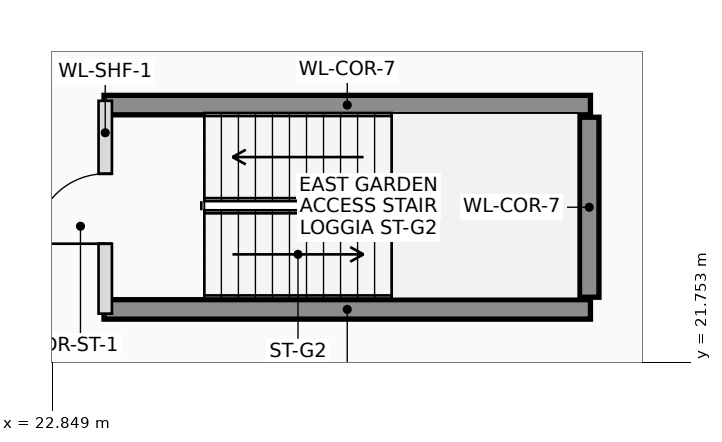
"""IFC4 building model, lengths in metres.
Left out: names, types, materials, properties, quantities, classifications, styles, units other than length and angle.
Written with IfcOpenShell. Run it as: python <this file> out.ifc"""

import sys

from ifc_helpers import new_model, si_unit, direction, frame, frame_2d, origin, place, context, subcontext, project, spatial, rectangle, extrude, element, fill, save


model = new_model("IFC4")
c1 = context("Model", 3, precision=1e-05, world=origin(), true_north=direction((0.0, 1.0)))
c2 = subcontext(c1, "Body", "Model", "MODEL_VIEW")
j1 = project(units=[si_unit("LENGTHUNIT", "METRE"), si_unit("PLANEANGLEUNIT", "RADIAN")], contexts=[c1])
p1 = place(None, origin())
s1 = spatial("IfcSite", under=j1, at=p1, CompositionType="ELEMENT")
p2 = place(p1, origin())
s2 = spatial("IfcBuilding", under=s1, at=p2, CompositionType="ELEMENT")
p3 = place(p2, frame((0.0, 0.0, 16.2)))
s3 = spatial("IfcBuildingStorey", under=s2, at=p3, CompositionType="ELEMENT", Elevation=16.2)
for number, where, z_axis, x_axis in (
    (1, (23.7, 25.98, 0.0), (0.0, 0.0, 1.0), (1.0, 0.0, 0.0)),
    (2, (23.7, 22.62, 0.0), (0.0, 0.0, 1.0), (1.0, 0.0, 0.0)),
):
    element("IfcWall", number, at=place(p3, frame(where, z_axis=z_axis, x_axis=x_axis)), inside=s3, PredefinedType="SHEAR", context=c2, shape_type="SweptSolid", body=[
        extrude(rectangle(XDim=8.0, YDim=0.32, at=frame_2d((4.0, 0.0))), origin(), (0.0, 0.0, 1.0), 3.9),
    ])
p4 = place(p3, frame((31.68, 22.82, 0.0), z_axis=(0.0, 0.0, 1.0), x_axis=(0.0, 1.0, 0.0)))
e3 = element("IfcWall", 3, at=p4, inside=s3, PredefinedType="SHEAR", context=c2, shape_type="SweptSolid", body=[
    extrude(rectangle(XDim=2.96, YDim=0.32, at=frame_2d((1.48, 0.0))), origin(), (0.0, 0.0, 1.0), 3.9),
])
p5 = place(p3, frame((23.72, 22.55, 0.0), z_axis=(0.0, 0.0, 1.0), x_axis=(0.0, 1.0, 0.0)))
e4 = element("IfcWall", 4, at=p5, inside=s3, PredefinedType="PLUMBINGWALL", context=c2, shape_type="SweptSolid", body=[
    extrude(rectangle(XDim=3.5, YDim=0.22, at=frame_2d((1.75, 0.0))), origin(), (0.0, 0.0, 1.0), 3.56),
])
p6 = place(p5, frame((1.15, 0.0, 0.0)))
e5 = element("IfcOpeningElement", 5, at=p6, cuts=e4, PredefinedType="OPENING", context=c2, shape_type="SweptSolid", body=[
    extrude(rectangle(XDim=1.15, YDim=2.15, at=frame_2d((0.575, 1.075))), frame((0.0, 0.12, 0.0), z_axis=(0.0, -1.0, 0.0), x_axis=(1.0, 0.0, 0.0)), (0.0, 0.0, 1.0), 0.24),
])
p7 = place(p6, origin())
e6 = element("IfcDoor", 6, at=p7, inside=s3, OperationType="SINGLE_SWING_LEFT", PredefinedType="DOOR", context=c2, shape_type="SweptSolid", body=[
    extrude(rectangle(XDim=1.15, YDim=2.15, at=frame_2d((0.575, 1.075))), frame((0.0, 0.025, 0.0), z_axis=(0.0, -1.0, 0.0), x_axis=(1.0, 0.0, 0.0)), (0.0, 0.0, 1.0), 0.05),
])
fill(e5, e6)
save(model, sys.argv[1])
